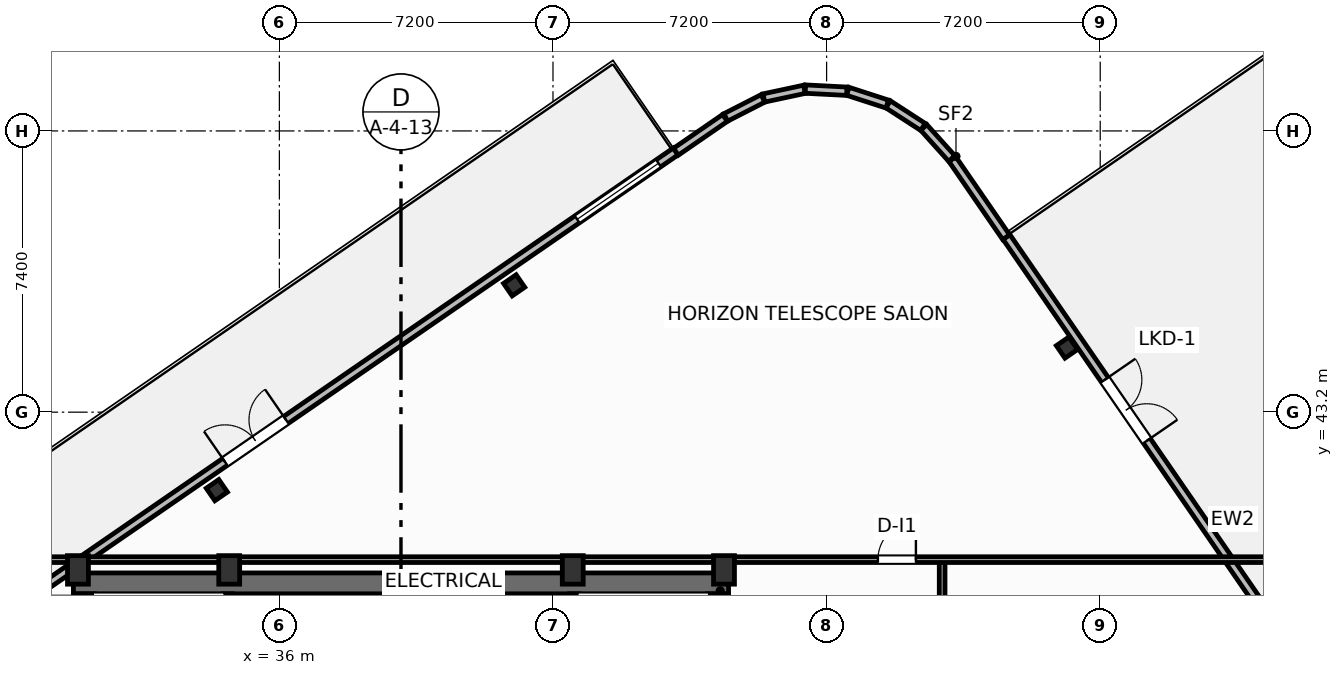
"""IFC4 building model, lengths in metres.
Left out: names, types, materials, properties, quantities, classifications, styles, units other than length and angle.
Written with IfcOpenShell. Run it as: python <this file> out.ifc"""

import sys

from ifc_helpers import new_model, si_unit, direction, frame, frame_2d, origin, origin_2d, place, context, subcontext, project, spatial, rectangle, i_section, extrude, element, fill, save


model = new_model("IFC4")
c1 = context("Model", 3, precision=1e-05, world=origin(), true_north=direction((0.0, 1.0)))
c2 = subcontext(c1, "Body", "Model", "MODEL_VIEW")
j1 = project(units=[si_unit("LENGTHUNIT", "METRE"), si_unit("PLANEANGLEUNIT", "RADIAN")], contexts=[c1])
p1 = place(None, origin())
s1 = spatial("IfcSite", under=j1, at=p1, CompositionType="ELEMENT")
p2 = place(p1, origin())
s2 = spatial("IfcBuilding", under=s1, at=p2, CompositionType="ELEMENT")
p3 = place(p2, frame((0.0, 0.0, 296.3)))
s3 = spatial("IfcBuildingStorey", under=s2, at=p3, CompositionType="ELEMENT", Elevation=296.3)
for number, where, z_axis, x_axis in (
    (1, (30.7, 39.05, 0.0), (0.0, 0.0, 1.0), (1.0, 0.0, 0.0)),
    (2, (34.68, 39.05, 0.0), (0.0, 0.0, 1.0), (1.0, 0.0, 0.0)),
    (3, (43.72, 39.05, 0.0), (0.0, 0.0, 1.0), (1.0, 0.0, 0.0)),
    (4, (47.7, 39.05, 0.0), (0.0, 0.0, 1.0), (1.0, 0.0, 0.0)),
):
    element("IfcColumn", number, at=place(p3, frame(where, z_axis=z_axis, x_axis=x_axis)), inside=s3, PredefinedType="COLUMN", context=c2, shape_type="SweptSolid", body=[
        extrude(rectangle(XDim=0.55, YDim=0.75, at=origin_2d()), origin(), (0.0, 0.0, 1.0), 4.8),
    ])
p4 = place(p3, frame((30.58, 38.695, 0.0), z_axis=(0.0, 0.0, 1.0), x_axis=(1.0, 0.0, 0.0)))
e5 = element("IfcWall", 5, at=p4, inside=s3, PredefinedType="SHEAR", context=c2, shape_type="SweptSolid", body=[
    extrude(rectangle(XDim=17.24, YDim=0.55, at=frame_2d((8.62, 0.0))), origin(), (0.0, 0.0, 1.0), 4.55),
])
for number, where, z_axis, x_axis in (
    (6, (30.855, 29.2, 0.0), (0.0, 0.0, 1.0), (0.0, 1.0, 0.0)),
    (7, (47.545, 29.2, 0.0), (0.0, 0.0, 1.0), (0.0, 1.0, 0.0)),
):
    element("IfcWall", number, at=place(p3, frame(where, z_axis=z_axis, x_axis=x_axis)), inside=s3, PredefinedType="SHEAR", context=c2, shape_type="SweptSolid", body=[
        extrude(rectangle(XDim=9.22, YDim=0.55, at=frame_2d((4.61, 0.0))), origin(), (0.0, 0.0, 1.0), 4.55),
    ])
p5 = place(p3, frame((34.64, 29.2, 0.0), z_axis=(0.0, 0.0, 1.0), x_axis=(0.0, 1.0, 0.0)))
e8 = element("IfcWall", 8, at=p5, inside=s3, PredefinedType="SHEAR", context=c2, shape_type="SweptSolid", body=[
    extrude(rectangle(XDim=9.22, YDim=0.25, at=frame_2d((4.61, 0.0))), origin(), (0.0, 0.0, 1.0), 4.55),
])
p6 = place(p5, frame((0.65, 0.0, 0.0)))
e9 = element("IfcOpeningElement", 9, at=p6, cuts=e8, PredefinedType="OPENING", context=c2, shape_type="SweptSolid", body=[
    extrude(rectangle(XDim=1.05, YDim=2.15, at=frame_2d((0.525, 1.075))), frame((0.0, 0.135, 0.0), z_axis=(0.0, -1.0, 0.0), x_axis=(1.0, 0.0, 0.0)), (0.0, 0.0, 1.0), 0.27),
])
p7 = place(p3, frame((43.76, 29.2, 0.0), z_axis=(0.0, 0.0, 1.0), x_axis=(0.0, 1.0, 0.0)))
e10 = element("IfcWall", 10, at=p7, inside=s3, PredefinedType="SHEAR", context=c2, shape_type="SweptSolid", body=[
    extrude(rectangle(XDim=9.22, YDim=0.25, at=frame_2d((4.61, 0.0))), origin(), (0.0, 0.0, 1.0), 4.55),
])
p8 = place(p7, frame((0.65, 0.0, 0.0)))
e11 = element("IfcOpeningElement", 11, at=p8, cuts=e10, PredefinedType="OPENING", context=c2, shape_type="SweptSolid", body=[
    extrude(rectangle(XDim=1.05, YDim=2.15, at=frame_2d((0.525, 1.075))), frame((0.0, 0.135, 0.0), z_axis=(0.0, -1.0, 0.0), x_axis=(1.0, 0.0, 0.0)), (0.0, 0.0, 1.0), 0.27),
])
for number, where, z_axis, x_axis in (
    (12, (56.724, 44.9, -0.32), (0.0, 0.0, 1.0), (0.824, 0.567, 0.0)),
    (13, (42.178, 46.537, -0.32), (0.0, 0.0, 1.0), (0.824, 0.567, 0.0)),
    (14, (34.355, 41.148, -0.32), (0.0, 0.0, 1.0), (0.824, 0.567, 0.0)),
):
    element("IfcColumn", number, at=place(p3, frame(where, z_axis=z_axis, x_axis=x_axis)), inside=s3, PredefinedType="COLUMN", context=c2, shape_type="SweptSolid", body=[
        extrude(i_section(OverallWidth=0.401, OverallDepth=0.399, WebThickness=0.025, FlangeThickness=0.04, FilletRadius=0.022, at=origin_2d()), origin(), (0.0, 0.0, 1.0), 5.12),
    ])
p9 = place(p3, frame((13.489, 27.37, 0.0), z_axis=(0.0, 0.0, 1.0), x_axis=(0.823532439547, 0.567269178622, 0.0)))
e15 = element("IfcWall", 15, at=p9, inside=s3, PredefinedType="SOLIDWALL", context=c2, shape_type="SweptSolid", body=[
    extrude(rectangle(XDim=40.0, YDim=0.22, at=frame_2d((20.0, 0.0))), origin(), (0.0, 0.0, 1.0), 3.83),
])
p10 = place(p9, frame((25.598, 0.0, 0.0)))
e16 = element("IfcOpeningElement", 16, at=p10, cuts=e15, PredefinedType="OPENING", context=c2, shape_type="SweptSolid", body=[
    extrude(rectangle(XDim=1.95, YDim=2.35, at=frame_2d((0.975, 1.175))), frame((0.0, 0.12, 0.0), z_axis=(0.0, -1.0, 0.0), x_axis=(1.0, 0.0, 0.0)), (0.0, 0.0, 1.0), 0.24),
])
p11 = place(p9, frame((0.55, 0.0, 0.75)))
e17 = element("IfcOpeningElement", 17, at=p11, cuts=e15, PredefinedType="OPENING", context=c2, shape_type="SweptSolid", body=[
    extrude(rectangle(XDim=2.6, YDim=2.0, at=frame_2d((1.3, 1.0))), frame((0.0, 0.12, 0.0), z_axis=(0.0, -1.0, 0.0), x_axis=(1.0, 0.0, 0.0)), (0.0, 0.0, 1.0), 0.24),
])
p12 = place(p9, frame((36.85, 0.0, 0.75)))
e18 = element("IfcOpeningElement", 18, at=p12, cuts=e15, PredefinedType="OPENING", context=c2, shape_type="SweptSolid", body=[
    extrude(rectangle(XDim=2.6, YDim=2.0, at=frame_2d((1.3, 1.0))), frame((0.0, 0.12, 0.0), z_axis=(0.0, -1.0, 0.0), x_axis=(1.0, 0.0, 0.0)), (0.0, 0.0, 1.0), 0.24),
])
p13 = place(p3, frame((55.132, 47.81, 0.0), z_axis=(0.0, 0.0, 1.0), x_axis=(0.567274059121, -0.823529077719, 0.0)))
e19 = element("IfcWall", 19, at=p13, inside=s3, PredefinedType="SOLIDWALL", context=c2, shape_type="SweptSolid", body=[
    extrude(rectangle(XDim=19.0, YDim=0.22, at=frame_2d((9.5, 0.0))), origin(), (0.0, 0.0, 1.0), 3.83),
])
p14 = place(p13, frame((4.562, 0.0, 0.0)))
e20 = element("IfcOpeningElement", 20, at=p14, cuts=e19, PredefinedType="OPENING", context=c2, shape_type="SweptSolid", body=[
    extrude(rectangle(XDim=1.95, YDim=2.35, at=frame_2d((0.975, 1.175))), frame((0.0, 0.12, 0.0), z_axis=(0.0, -1.0, 0.0), x_axis=(1.0, 0.0, 0.0)), (0.0, 0.0, 1.0), 0.24),
])
p15 = place(p3, frame((55.124, 47.804, 0.0), z_axis=(0.0, 0.0, 1.0), x_axis=(-0.567206317648, 0.823575736177, 0.0)))
e21 = element("IfcWall", 21, at=p15, inside=s3, PredefinedType="SOLIDWALL", context=c2, shape_type="SweptSolid", body=[
    extrude(rectangle(XDim=2.492, YDim=0.22, at=frame_2d((1.246, 0.0))), origin(), (0.0, 0.0, 1.0), 3.83),
])
p16 = place(p3, frame((53.694, 49.875, 0.0), z_axis=(0.0, 0.0, 1.0), x_axis=(-0.669883955163, 0.742465815116, 0.0)))
e22 = element("IfcWall", 22, at=p16, inside=s3, PredefinedType="SOLIDWALL", context=c2, shape_type="SweptSolid", body=[
    extrude(rectangle(XDim=1.1, YDim=0.22, at=frame_2d((0.55, 0.0))), origin(), (0.0, 0.0, 1.0), 3.83),
])
for number, where, z_axis, x_axis in (
    (23, (52.936, 50.706, 0.0), (0.0, 0.0, 1.0), (-0.839, 0.544, 0.0)),
    (24, (51.995, 51.307, 0.0), (0.0, 0.0, 1.0), (-0.951, 0.308, 0.0)),
    (25, (50.931, 51.645, 0.0), (0.0, 0.0, 1.0), (-0.999, 0.051, 0.0)),
    (26, (49.816, 51.696, 0.0), (0.0, 0.0, 1.0), (-0.978, -0.209, 0.0)),
):
    element("IfcWall", number, at=place(p3, frame(where, z_axis=z_axis, x_axis=x_axis)), inside=s3, PredefinedType="SOLIDWALL", context=c2, shape_type="SweptSolid", body=[
        extrude(rectangle(XDim=1.092, YDim=0.22, at=frame_2d((0.546, 0.0))), origin(), (0.0, 0.0, 1.0), 3.83),
    ])
p17 = place(p3, frame((48.726, 51.456, 0.0), z_axis=(0.0, 0.0, 1.0), x_axis=(-0.890532584352, -0.454919461231, 0.0)))
e27 = element("IfcWall", 27, at=p17, inside=s3, PredefinedType="SOLIDWALL", context=c2, shape_type="SweptSolid", body=[
    extrude(rectangle(XDim=1.1, YDim=0.22, at=frame_2d((0.55, 0.0))), origin(), (0.0, 0.0, 1.0), 3.83),
])
p18 = place(p3, frame((47.726, 50.941, 0.0), z_axis=(0.0, 0.0, 1.0), x_axis=(-0.823541565937, -0.567255929167, 0.0)))
e28 = element("IfcWall", 28, at=p18, inside=s3, PredefinedType="SOLIDWALL", context=c2, shape_type="SweptSolid", body=[
    extrude(rectangle(XDim=1.567, YDim=0.22, at=frame_2d((0.784, 0.0))), origin(), (0.0, 0.0, 1.0), 3.83),
])
p19 = place(p3, frame((53.44, 29.0, 0.0), z_axis=(0.0, 0.0, 1.0), x_axis=(0.0, 1.0, 0.0)))
e29 = element("IfcWall", 29, at=p19, inside=s3, PredefinedType="PARTITIONING", context=c2, shape_type="SweptSolid", body=[
    extrude(rectangle(XDim=10.32, YDim=0.15, at=frame_2d((5.16, 0.0))), origin(), (0.0, 0.0, 1.0), 4.55),
])
p20 = place(p19, frame((3.5, 0.0, 0.0)))
e30 = element("IfcOpeningElement", 30, at=p20, cuts=e29, PredefinedType="OPENING", context=c2, shape_type="SweptSolid", body=[
    extrude(rectangle(XDim=2.0, YDim=2.05, at=frame_2d((1.0, 1.025))), frame((0.0, 0.085, 0.0), z_axis=(0.0, -1.0, 0.0), x_axis=(1.0, 0.0, 0.0)), (0.0, 0.0, 1.0), 0.17),
])
p21 = place(p3, frame((28.0, 39.32, 0.0), z_axis=(0.0, 0.0, 1.0), x_axis=(1.0, 0.0, 0.0)))
e31 = element("IfcWall", 31, at=p21, inside=s3, PredefinedType="PARTITIONING", context=c2, shape_type="SweptSolid", body=[
    extrude(rectangle(XDim=34.0, YDim=0.15, at=frame_2d((17.0, 0.0))), origin(), (0.0, 0.0, 1.0), 4.55),
])
p22 = place(p21, frame((23.75, 0.0, 0.0)))
e32 = element("IfcOpeningElement", 32, at=p22, cuts=e31, PredefinedType="OPENING", context=c2, shape_type="SweptSolid", body=[
    extrude(rectangle(XDim=1.0, YDim=2.05, at=frame_2d((0.5, 1.025))), frame((0.0, 0.085, 0.0), z_axis=(0.0, -1.0, 0.0), x_axis=(1.0, 0.0, 0.0)), (0.0, 0.0, 1.0), 0.17),
])
p23 = place(p10, origin())
e33 = element("IfcDoor", 33, at=p23, inside=s3, OperationType="DOUBLE_DOOR_SINGLE_SWING", PredefinedType="DOOR", context=c2, shape_type="SweptSolid", body=[
    extrude(rectangle(XDim=1.95, YDim=2.35, at=frame_2d((0.975, 1.175))), frame((0.0, 0.025, 0.0), z_axis=(0.0, -1.0, 0.0), x_axis=(1.0, 0.0, 0.0)), (0.0, 0.0, 1.0), 0.05),
])
fill(e16, e33)
p24 = place(p12, origin())
e34 = element("IfcWindow", 34, at=p24, inside=s3, PartitioningType="SINGLE_PANEL", PredefinedType="WINDOW", context=c2, shape_type="SweptSolid", body=[
    extrude(rectangle(XDim=2.6, YDim=2.0, at=frame_2d((1.3, 1.0))), frame((0.0, 0.03, 0.0), z_axis=(0.0, -1.0, 0.0), x_axis=(1.0, 0.0, 0.0)), (0.0, 0.0, 1.0), 0.06),
])
fill(e18, e34)
p25 = place(p14, origin())
e35 = element("IfcDoor", 35, at=p25, inside=s3, OperationType="DOUBLE_DOOR_SINGLE_SWING", PredefinedType="DOOR", context=c2, shape_type="SweptSolid", body=[
    extrude(rectangle(XDim=1.95, YDim=2.35, at=frame_2d((0.975, 1.175))), frame((0.0, 0.025, 0.0), z_axis=(0.0, -1.0, 0.0), x_axis=(1.0, 0.0, 0.0)), (0.0, 0.0, 1.0), 0.05),
])
fill(e20, e35)
p26 = place(p22, origin())
e36 = element("IfcDoor", 36, at=p26, inside=s3, OperationType="SINGLE_SWING_RIGHT", PredefinedType="DOOR", context=c2, shape_type="SweptSolid", body=[
    extrude(rectangle(XDim=1.0, YDim=2.05, at=frame_2d((0.5, 1.025))), frame((0.0, 0.025, 0.0), z_axis=(0.0, -1.0, 0.0), x_axis=(1.0, 0.0, 0.0)), (0.0, 0.0, 1.0), 0.05),
])
fill(e32, e36)
save(model, sys.argv[1])
